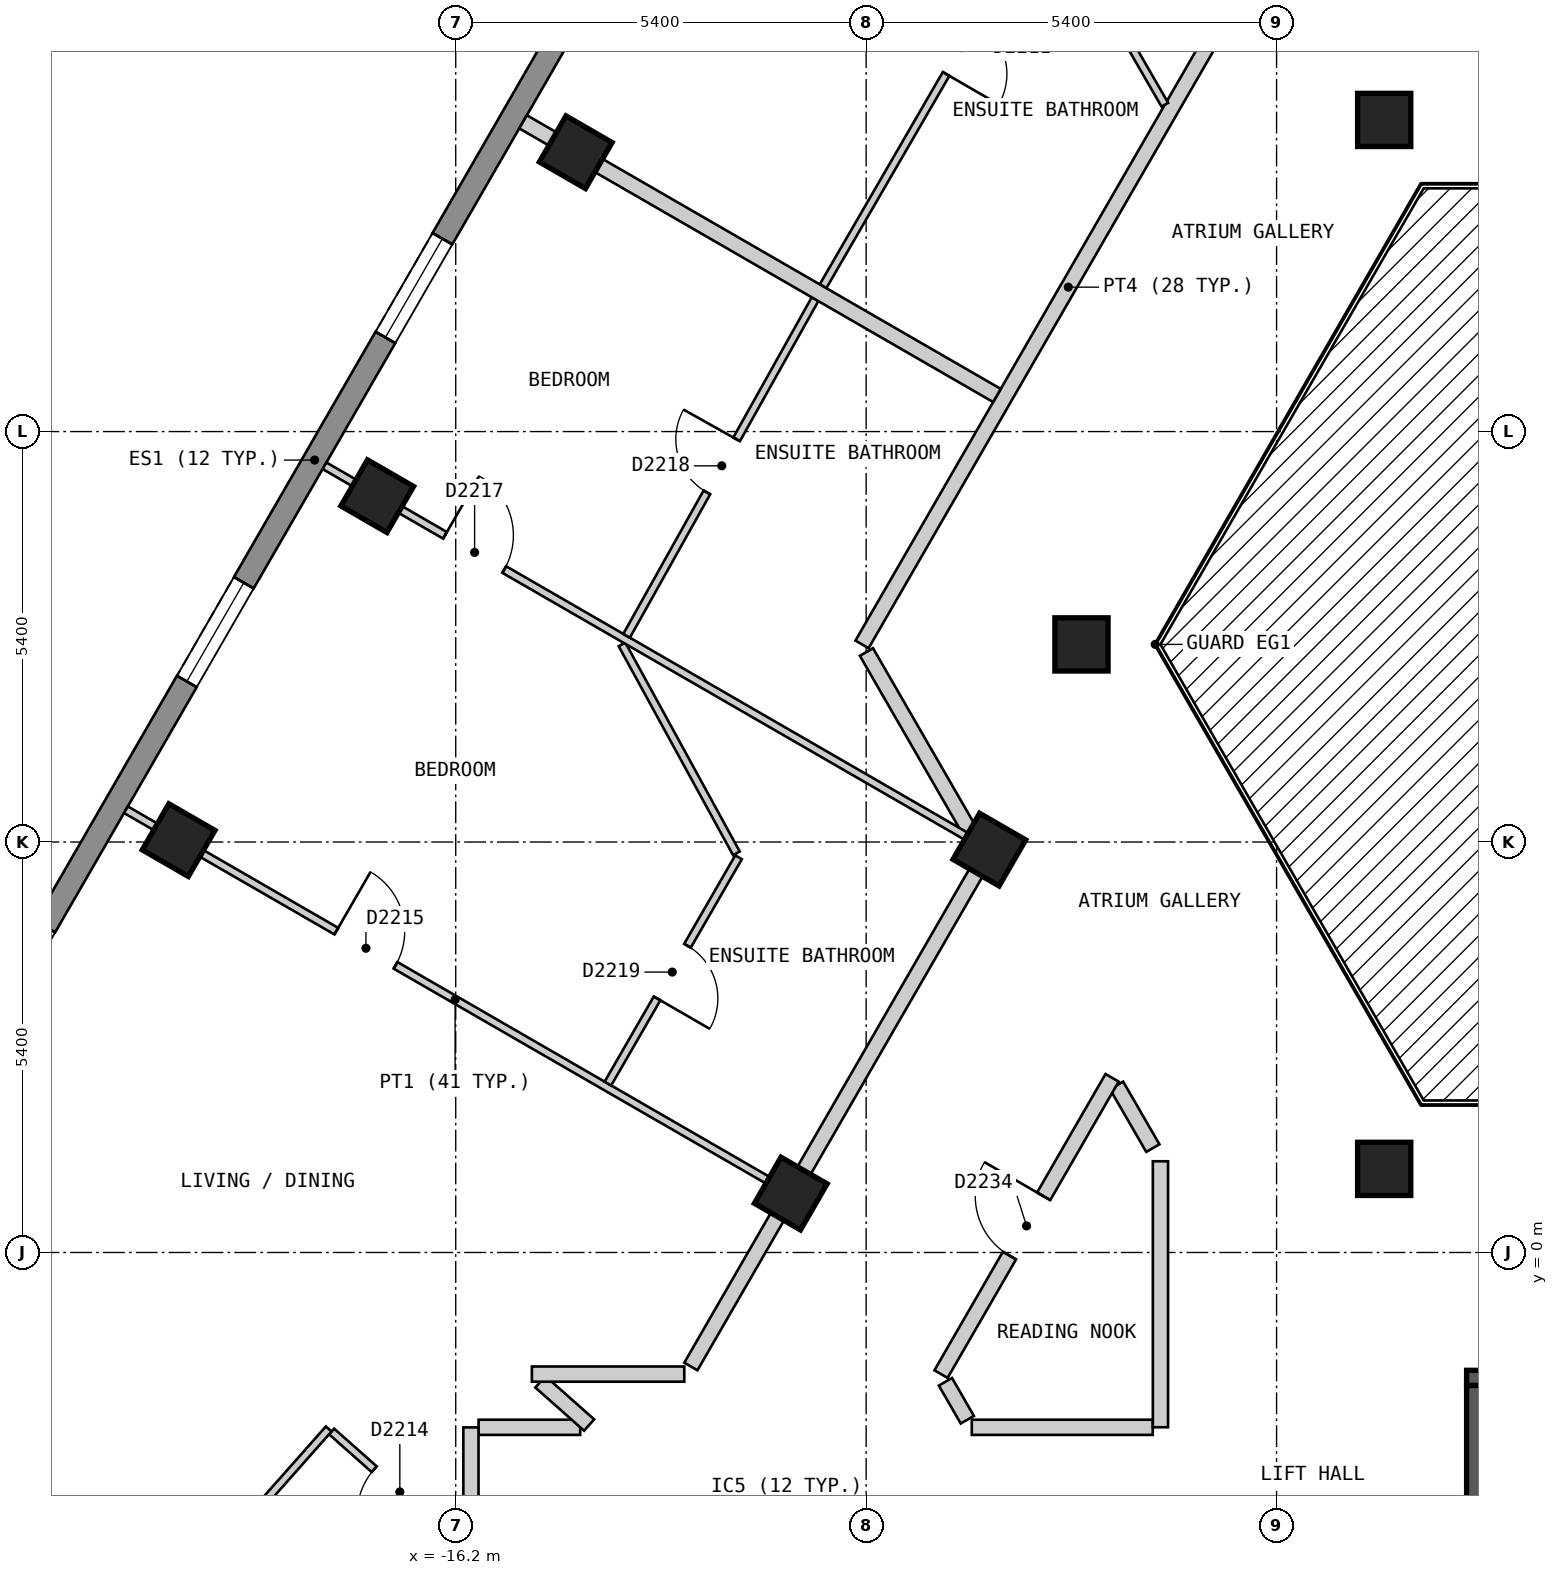
"""IFC4 building model, lengths in metres.
Left out: names, types, materials, properties, quantities, classifications, styles, units other than length and angle.
Written with IfcOpenShell. Run it as: python <this file> out.ifc"""

import sys

from ifc_helpers import new_model, si_unit, direction, frame, frame_2d, origin, origin_2d, place, context, subcontext, project, spatial, polyline, rectangle, outline, extrude, element, fill, save


model = new_model("IFC4")
c1 = context("Model", 3, precision=1e-05, world=origin(), true_north=direction((0.0, 1.0)))
c2 = subcontext(c1, "Body", "Model", "MODEL_VIEW")
j1 = project(units=[si_unit("LENGTHUNIT", "METRE"), si_unit("PLANEANGLEUNIT", "RADIAN")], contexts=[c1])
p1 = place(None, origin())
s1 = spatial("IfcSite", under=j1, at=p1, CompositionType="ELEMENT")
p2 = place(p1, origin())
s2 = spatial("IfcBuilding", under=s1, at=p2, CompositionType="ELEMENT")
p3 = place(p2, frame((0.0, 0.0, 229.8)))
s3 = spatial("IfcBuildingStorey", under=s2, at=p3, CompositionType="ELEMENT", Elevation=229.8)
for number, where, z_axis, x_axis in (
    (1, (-14.621, 14.475, 0.0), (0.0, 0.0, 1.0), (-0.5, -0.866, 0.0)),
    (2, (-17.233, 9.95, 0.0), (0.0, 0.0, 1.0), (-0.5, -0.866, 0.0)),
    (3, (-19.846, 5.425, 0.0), (0.0, 0.0, 1.0), (-0.5, -0.866, 0.0)),
    (4, (-3.984, 14.9, 0.0), (0.0, 0.0, 1.0), (1.0, 0.0, 0.0)),
    (5, (-7.967, 8.0, 0.0), (0.0, 0.0, 1.0), (1.0, 0.0, 0.0)),
    (6, (-9.179, 5.3, 0.0), (0.0, 0.0, 1.0), (-0.5, -0.866, 0.0)),
    (7, (-3.984, 1.1, 0.0), (0.0, 0.0, 1.0), (1.0, 0.0, 0.0)),
    (8, (-11.792, 0.775, 0.0), (0.0, 0.0, 1.0), (-0.5, -0.866, 0.0)),
):
    element("IfcColumn", number, at=place(p3, frame(where, z_axis=z_axis, x_axis=x_axis)), inside=s3, PredefinedType="COLUMN", context=c2, shape_type="SweptSolid", body=[
        extrude(rectangle(XDim=0.7, YDim=0.7, at=origin_2d()), origin(), (0.0, 0.0, 1.0), 3.0),
    ])
p4 = place(p3, frame((-12.514, 20.025, 0.0), z_axis=(0.0, 0.0, 1.0), x_axis=(-0.500003656944, -0.866023292436, 0.0)))
e9 = element("IfcWall", 9, at=p4, inside=s3, PredefinedType="SOLIDWALL", context=c2, shape_type="SweptSolid", body=[
    extrude(outline(polyline([(0.0, -0.15), (22.17, -0.15), (22.09, 0.15), (0.08, 0.15), (0.0, -0.15)])), origin(), (0.0, 0.0, 1.0), 2.7),
])
p5 = place(p4, frame((2.497, 0.0, 0.15)))
e10 = element("IfcOpeningElement", 10, at=p5, cuts=e9, PredefinedType="OPENING", context=c2, shape_type="SweptSolid", body=[
    extrude(rectangle(XDim=1.5, YDim=2.1, at=frame_2d((0.75, 1.05))), frame((0.0, 0.16, 0.0), z_axis=(0.0, -1.0, 0.0), x_axis=(1.0, 0.0, 0.0)), (0.0, 0.0, 1.0), 0.32),
])
p6 = place(p4, frame((7.722, 0.0, 0.15)))
e11 = element("IfcOpeningElement", 11, at=p6, cuts=e9, PredefinedType="OPENING", context=c2, shape_type="SweptSolid", body=[
    extrude(rectangle(XDim=1.5, YDim=2.1, at=frame_2d((0.75, 1.05))), frame((0.0, 0.16, 0.0), z_axis=(0.0, -1.0, 0.0), x_axis=(1.0, 0.0, 0.0)), (0.0, 0.0, 1.0), 0.32),
])
p7 = place(p4, frame((12.948, 0.0, 0.15)))
e12 = element("IfcOpeningElement", 12, at=p7, cuts=e9, PredefinedType="OPENING", context=c2, shape_type="SweptSolid", body=[
    extrude(rectangle(XDim=1.5, YDim=2.1, at=frame_2d((0.75, 1.05))), frame((0.0, 0.16, 0.0), z_axis=(0.0, -1.0, 0.0), x_axis=(1.0, 0.0, 0.0)), (0.0, 0.0, 1.0), 0.32),
])
p8 = place(p4, frame((18.173, 0.0, 0.15)))
e13 = element("IfcOpeningElement", 13, at=p8, cuts=e9, PredefinedType="OPENING", context=c2, shape_type="SweptSolid", body=[
    extrude(rectangle(XDim=1.5, YDim=2.1, at=frame_2d((0.75, 1.05))), frame((0.0, 0.16, 0.0), z_axis=(0.0, -1.0, 0.0), x_axis=(1.0, 0.0, 0.0)), (0.0, 0.0, 1.0), 0.32),
])
p9 = place(p3, frame((-2.9, -1.65, 0.0), z_axis=(0.0, 0.0, 1.0), x_axis=(1.0, 0.0, 0.0)))
e14 = element("IfcWall", 14, at=p9, inside=s3, PredefinedType="SOLIDWALL", context=c2, shape_type="SweptSolid", body=[
    extrude(rectangle(XDim=5.8, YDim=0.2, at=frame_2d((2.9, 0.0))), origin(), (0.0, 0.0, 1.0), 2.7),
])
p10 = place(p9, frame((0.3, 0.0, 0.0)))
e15 = element("IfcOpeningElement", 15, at=p10, cuts=e14, PredefinedType="OPENING", context=c2, shape_type="SweptSolid", body=[
    extrude(rectangle(XDim=1.2, YDim=2.1, at=frame_2d((0.6, 1.05))), frame((0.0, 0.11, 0.0), z_axis=(0.0, -1.0, 0.0), x_axis=(1.0, 0.0, 0.0)), (0.0, 0.0, 1.0), 0.22),
])
p11 = place(p3, frame((-2.8, -4.5, 0.0), z_axis=(0.0, 0.0, 1.0), x_axis=(0.0, 1.0, 0.0)))
e16 = element("IfcWall", 16, at=p11, inside=s3, PredefinedType="SOLIDWALL", context=c2, shape_type="SweptSolid", body=[
    extrude(rectangle(XDim=2.75, YDim=0.2, at=frame_2d((1.375, 0.0))), origin(), (0.0, 0.0, 1.0), 2.7),
])
p12 = place(p3, frame((-10.796, 7.9, 0.0), z_axis=(0.0, 0.0, 1.0), x_axis=(0.499674397761, -0.866213308731, 0.0)))
e17 = element("IfcWall", 17, at=p12, inside=s3, PredefinedType="PARTITIONING", context=c2, shape_type="SweptSolid", body=[
    extrude(rectangle(XDim=2.785, YDim=0.2, at=frame_2d((1.393, 0.0))), origin(), (0.0, 0.0, 1.0), 2.7),
])
p13 = place(p3, frame((-7.505, 2.198, 0.0), z_axis=(0.0, 0.0, 1.0), x_axis=(0.500409926597, -0.865788603161, 0.0)))
e18 = element("IfcWall", 18, at=p13, inside=s3, PredefinedType="PARTITIONING", context=c2, shape_type="SweptSolid", body=[
    extrude(rectangle(XDim=0.953, YDim=0.2, at=frame_2d((0.477, 0.0))), origin(), (0.0, 0.0, 1.0), 2.7),
])
p14 = place(p3, frame((-9.757, -1.701, 0.0), z_axis=(0.0, 0.0, 1.0), x_axis=(0.49996696679, -0.866044474677, 0.0)))
e19 = element("IfcWall", 19, at=p14, inside=s3, PredefinedType="PARTITIONING", context=c2, shape_type="SweptSolid", body=[
    extrude(rectangle(XDim=0.576, YDim=0.2, at=frame_2d((0.288, 0.0))), origin(), (0.0, 0.0, 1.0), 2.7),
])
p15 = place(p3, frame((-15.899, -2.3, 0.0), z_axis=(0.0, 0.0, 1.0), x_axis=(1.0, 0.0, 0.0)))
e20 = element("IfcWall", 20, at=p15, inside=s3, PredefinedType="PARTITIONING", context=c2, shape_type="SweptSolid", body=[
    extrude(rectangle(XDim=1.337, YDim=0.2, at=frame_2d((0.668, 0.0))), origin(), (0.0, 0.0, 1.0), 2.7),
])
p16 = place(p3, frame((-9.41, -2.3, 0.0), z_axis=(0.0, 0.0, 1.0), x_axis=(1.0, 0.0, 0.0)))
e21 = element("IfcWall", 21, at=p16, inside=s3, PredefinedType="PARTITIONING", context=c2, shape_type="SweptSolid", body=[
    extrude(rectangle(XDim=2.381, YDim=0.2, at=frame_2d((1.19, 0.0))), origin(), (0.0, 0.0, 1.0), 2.7),
])
p17 = place(p3, frame((-9.815, -1.6, 0.0), z_axis=(0.0, 0.0, 1.0), x_axis=(0.500058909736, 0.865991389561, 0.0)))
e22 = element("IfcWall", 22, at=p17, inside=s3, PredefinedType="PARTITIONING", context=c2, shape_type="SweptSolid", body=[
    extrude(rectangle(XDim=4.501, YDim=0.2, at=frame_2d((2.251, 0.0))), origin(), (0.0, 0.0, 1.0), 2.7),
])
p18 = place(p17, frame((1.801, 0.0, 0.0)))
e23 = element("IfcOpeningElement", 23, at=p18, cuts=e22, PredefinedType="OPENING", context=c2, shape_type="SweptSolid", body=[
    extrude(rectangle(XDim=0.9, YDim=2.1, at=frame_2d((0.45, 1.05))), frame((0.0, 0.11, 0.0), z_axis=(0.0, -1.0, 0.0), x_axis=(1.0, 0.0, 0.0)), (0.0, 0.0, 1.0), 0.22),
])
p19 = place(p3, frame((-13.106, -1.5, 0.0), z_axis=(0.0, 0.0, 1.0), x_axis=(0.500025705601, 0.86601056214, 0.0)))
e24 = element("IfcWall", 24, at=p19, inside=s3, PredefinedType="PARTITIONING", context=c2, shape_type="SweptSolid", body=[
    extrude(rectangle(XDim=7.735, YDim=0.2, at=frame_2d((3.868, 0.0))), origin(), (0.0, 0.0, 1.0), 2.7),
])
p20 = place(p3, frame((-10.854, 8.0, 0.0), z_axis=(0.0, 0.0, 1.0), x_axis=(0.499997637144, 0.866026767976, 0.0)))
e25 = element("IfcWall", 25, at=p20, inside=s3, PredefinedType="PARTITIONING", context=c2, shape_type="SweptSolid", body=[
    extrude(rectangle(XDim=10.854, YDim=0.2, at=frame_2d((5.427, 0.0))), origin(), (0.0, 0.0, 1.0), 2.7),
])
p21 = place(p3, frame((-6.928, -2.299, 0.0), z_axis=(0.0, 0.0, 1.0), x_axis=(0.0, 1.0, 0.0)))
e26 = element("IfcWall", 26, at=p21, inside=s3, PredefinedType="PARTITIONING", context=c2, shape_type="SweptSolid", body=[
    extrude(rectangle(XDim=3.499, YDim=0.2, at=frame_2d((1.75, 0.0))), origin(), (0.0, 0.0, 1.0), 2.7),
])
p22 = place(p3, frame((-16.0, -6.099, 0.0), z_axis=(0.0, 0.0, 1.0), x_axis=(0.0, 1.0, 0.0)))
e27 = element("IfcWall", 27, at=p22, inside=s3, PredefinedType="PARTITIONING", context=c2, shape_type="SweptSolid", body=[
    extrude(rectangle(XDim=3.798, YDim=0.2, at=frame_2d((1.899, 0.0))), origin(), (0.0, 0.0, 1.0), 2.7),
])
p23 = place(p22, frame((0.587, 0.0, 0.0)))
e28 = element("IfcOpeningElement", 28, at=p23, cuts=e27, PredefinedType="OPENING", context=c2, shape_type="SweptSolid", body=[
    extrude(rectangle(XDim=1.0, YDim=2.1, at=frame_2d((0.5, 1.05))), frame((0.0, 0.11, 0.0), z_axis=(0.0, -1.0, 0.0), x_axis=(1.0, 0.0, 0.0)), (0.0, 0.0, 1.0), 0.22),
])
p24 = place(p3, frame((-7.628, 16.412, 0.0), z_axis=(0.0, 0.0, 1.0), x_axis=(0.500159472144, -0.86593331292, 0.0)))
e29 = element("IfcWall", 29, at=p24, inside=s3, PredefinedType="PARTITIONING", context=c2, shape_type="SweptSolid", body=[
    extrude(rectangle(XDim=1.515, YDim=0.1, at=frame_2d((0.758, 0.0))), origin(), (0.0, 0.0, 1.0), 2.7),
])
p25 = place(p3, frame((-14.012, 8.0, 0.0), z_axis=(0.0, 0.0, 1.0), x_axis=(0.480183343847, -0.877168145963, 0.0)))
e30 = element("IfcWall", 30, at=p25, inside=s3, PredefinedType="PARTITIONING", context=c2, shape_type="SweptSolid", body=[
    extrude(rectangle(XDim=3.134, YDim=0.1, at=frame_2d((1.567, 0.0))), origin(), (0.0, 0.0, 1.0), 2.7),
])
p26 = place(p3, frame((-20.539, 5.825, 0.0), z_axis=(0.0, 0.0, 1.0), x_axis=(0.866089650643, -0.499888704662, 0.0)))
e31 = element("IfcWall", 31, at=p26, inside=s3, PredefinedType="PARTITIONING", context=c2, shape_type="SweptSolid", body=[
    extrude(rectangle(XDim=10.0, YDim=0.1, at=frame_2d((5.0, 0.0))), origin(), (0.0, 0.0, 1.0), 2.7),
])
p27 = place(p26, frame((3.196, 0.0, 0.0)))
e32 = element("IfcOpeningElement", 32, at=p27, cuts=e31, PredefinedType="OPENING", context=c2, shape_type="SweptSolid", body=[
    extrude(rectangle(XDim=0.9, YDim=2.1, at=frame_2d((0.45, 1.05))), frame((0.0, 0.06, 0.0), z_axis=(0.0, -1.0, 0.0), x_axis=(1.0, 0.0, 0.0)), (0.0, 0.0, 1.0), 0.12),
])
p28 = place(p3, frame((-23.429, -2.858, 0.0), z_axis=(0.0, 0.0, 1.0), x_axis=(0.8659754619, -0.500086491905, 0.0)))
e33 = element("IfcWall", 33, at=p28, inside=s3, PredefinedType="PARTITIONING", context=c2, shape_type="SweptSolid", body=[
    extrude(rectangle(XDim=3.831, YDim=0.1, at=frame_2d((1.916, 0.0))), origin(), (0.0, 0.0, 1.0), 2.7),
])
p29 = place(p28, frame((1.991, 0.0, 0.0)))
e34 = element("IfcOpeningElement", 34, at=p29, cuts=e33, PredefinedType="OPENING", context=c2, shape_type="SweptSolid", body=[
    extrude(rectangle(XDim=0.9, YDim=2.1, at=frame_2d((0.45, 1.05))), frame((0.0, 0.06, 0.0), z_axis=(0.0, -1.0, 0.0), x_axis=(1.0, 0.0, 0.0)), (0.0, 0.0, 1.0), 0.12),
])
p30 = place(p3, frame((-17.926, 10.35, 0.0), z_axis=(0.0, 0.0, 1.0), x_axis=(0.866018411306, -0.500012111133, 0.0)))
e35 = element("IfcWall", 35, at=p30, inside=s3, PredefinedType="PARTITIONING", context=c2, shape_type="SweptSolid", body=[
    extrude(rectangle(XDim=9.898, YDim=0.1, at=frame_2d((4.949, 0.0))), origin(), (0.0, 0.0, 1.0), 2.7),
])
p31 = place(p30, frame((1.83, 0.0, 0.0)))
e36 = element("IfcOpeningElement", 36, at=p31, cuts=e35, PredefinedType="OPENING", context=c2, shape_type="SweptSolid", body=[
    extrude(rectangle(XDim=0.9, YDim=2.1, at=frame_2d((0.45, 1.05))), frame((0.0, 0.06, 0.0), z_axis=(0.0, -1.0, 0.0), x_axis=(1.0, 0.0, 0.0)), (0.0, 0.0, 1.0), 0.12),
])
p32 = place(p3, frame((-17.833, -2.355, 0.0), z_axis=(0.0, 0.0, 1.0), x_axis=(0.748577710953, -0.663047065196, 0.0)))
e37 = element("IfcWall", 37, at=p32, inside=s3, PredefinedType="PARTITIONING", context=c2, shape_type="SweptSolid", body=[
    extrude(rectangle(XDim=2.315, YDim=0.1, at=frame_2d((1.157, 0.0))), origin(), (0.0, 0.0, 1.0), 2.7),
])
p33 = place(p32, frame((0.749, 0.0, 0.0)))
e38 = element("IfcOpeningElement", 38, at=p33, cuts=e37, PredefinedType="OPENING", context=c2, shape_type="SweptSolid", body=[
    extrude(rectangle(XDim=0.9, YDim=2.1, at=frame_2d((0.45, 1.05))), frame((0.0, 0.06, 0.0), z_axis=(0.0, -1.0, 0.0), x_axis=(1.0, 0.0, 0.0)), (0.0, 0.0, 1.0), 0.12),
])
p34 = place(p3, frame((-14.198, 2.222, 0.0), z_axis=(0.0, 0.0, 1.0), x_axis=(0.500042121486, 0.866001083567, 0.0)))
e39 = element("IfcWall", 39, at=p34, inside=s3, PredefinedType="PARTITIONING", context=c2, shape_type="SweptSolid", body=[
    extrude(rectangle(XDim=3.438, YDim=0.1, at=frame_2d((1.719, 0.0))), origin(), (0.0, 0.0, 1.0), 2.7),
])
p35 = place(p34, frame((1.294, 0.0, 0.0)))
e40 = element("IfcOpeningElement", 40, at=p35, cuts=e39, PredefinedType="OPENING", context=c2, shape_type="SweptSolid", body=[
    extrude(rectangle(XDim=0.8, YDim=2.1, at=frame_2d((0.4, 1.05))), frame((0.0, 0.06, 0.0), z_axis=(0.0, -1.0, 0.0), x_axis=(1.0, 0.0, 0.0)), (0.0, 0.0, 1.0), 0.12),
])
p36 = place(p3, frame((-11.367, 12.712, 0.0), z_axis=(0.0, 0.0, 1.0), x_axis=(0.501473866443, 0.865172792727, 0.0)))
e41 = element("IfcWall", 41, at=p36, inside=s3, PredefinedType="PARTITIONING", context=c2, shape_type="SweptSolid", body=[
    extrude(rectangle(XDim=7.256, YDim=0.1, at=frame_2d((3.628, 0.0))), origin(), (0.0, 0.0, 1.0), 2.7),
])
p37 = place(p36, frame((3.228, 0.0, 0.0)))
e42 = element("IfcOpeningElement", 42, at=p37, cuts=e41, PredefinedType="OPENING", context=c2, shape_type="SweptSolid", body=[
    extrude(rectangle(XDim=0.8, YDim=2.1, at=frame_2d((0.4, 1.05))), frame((0.0, 0.06, 0.0), z_axis=(0.0, -1.0, 0.0), x_axis=(1.0, 0.0, 0.0)), (0.0, 0.0, 1.0), 0.12),
])
p38 = place(p3, frame((-13.952, 8.113, 0.0), z_axis=(0.0, 0.0, 1.0), x_axis=(0.488568218554, 0.872525699231, 0.0)))
e43 = element("IfcWall", 43, at=p38, inside=s3, PredefinedType="PARTITIONING", context=c2, shape_type="SweptSolid", body=[
    extrude(rectangle(XDim=5.076, YDim=0.1, at=frame_2d((2.538, 0.0))), origin(), (0.0, 0.0, 1.0), 2.7),
])
p39 = place(p38, frame((2.163, 0.0, 0.0)))
e44 = element("IfcOpeningElement", 44, at=p39, cuts=e43, PredefinedType="OPENING", context=c2, shape_type="SweptSolid", body=[
    extrude(rectangle(XDim=0.8, YDim=2.1, at=frame_2d((0.4, 1.05))), frame((0.0, 0.06, 0.0), z_axis=(0.0, -1.0, 0.0), x_axis=(1.0, 0.0, 0.0)), (0.0, 0.0, 1.0), 0.12),
])
p40 = place(p3, frame((-20.716, -5.532, 0.0), z_axis=(0.0, 0.0, 1.0), x_axis=(0.663278535613, 0.748372623895, 0.0)))
e45 = element("IfcWall", 45, at=p40, inside=s3, PredefinedType="PARTITIONING", context=c2, shape_type="SweptSolid", body=[
    extrude(rectangle(XDim=4.289, YDim=0.1, at=frame_2d((2.145, 0.0))), origin(), (0.0, 0.0, 1.0), 2.7),
])
p41 = place(p3, frame((-15.314, 14.875, 0.0), z_axis=(0.0, 0.0, 1.0), x_axis=(0.866001485781, -0.500041424909, 0.0)))
e46 = element("IfcWall", 46, at=p41, inside=s3, PredefinedType="PARTITIONING", context=c2, shape_type="SweptSolid", body=[
    extrude(rectangle(XDim=7.2, YDim=0.2, at=frame_2d((3.6, 0.0))), origin(), (0.0, 0.0, 1.0), 2.7),
])
p42 = place(p3, frame((-15.086, -1.702, 0.0), z_axis=(0.0, 0.0, 1.0), x_axis=(0.748305129876, -0.663354680846, 0.0)))
e47 = element("IfcWall", 47, at=p42, inside=s3, PredefinedType="PARTITIONING", context=c2, shape_type="SweptSolid", body=[
    extrude(rectangle(XDim=0.856, YDim=0.2, at=frame_2d((0.428, 0.0))), origin(), (0.0, 0.0, 1.0), 2.7),
])
p43 = place(p3, frame((-15.198, -1.6, 0.0), z_axis=(0.0, 0.0, 1.0), x_axis=(1.0, 0.0, 0.0)))
e48 = element("IfcWall", 48, at=p43, inside=s3, PredefinedType="PARTITIONING", context=c2, shape_type="SweptSolid", body=[
    extrude(rectangle(XDim=2.005, YDim=0.2, at=frame_2d((1.002, 0.0))), origin(), (0.0, 0.0, 1.0), 2.7),
])
p44 = place(p6, origin())
e49 = element("IfcWindow", 49, at=p44, inside=s3, PartitioningType="SINGLE_PANEL", PredefinedType="WINDOW", context=c2, shape_type="SweptSolid", body=[
    extrude(rectangle(XDim=1.5, YDim=2.1, at=frame_2d((0.75, 1.05))), frame((0.0, 0.03, 0.0), z_axis=(0.0, -1.0, 0.0), x_axis=(1.0, 0.0, 0.0)), (0.0, 0.0, 1.0), 0.06),
])
fill(e11, e49)
p45 = place(p7, origin())
e50 = element("IfcWindow", 50, at=p45, inside=s3, PartitioningType="SINGLE_PANEL", PredefinedType="WINDOW", context=c2, shape_type="SweptSolid", body=[
    extrude(rectangle(XDim=1.5, YDim=2.1, at=frame_2d((0.75, 1.05))), frame((0.0, 0.03, 0.0), z_axis=(0.0, -1.0, 0.0), x_axis=(1.0, 0.0, 0.0)), (0.0, 0.0, 1.0), 0.06),
])
fill(e12, e50)
p46 = place(p37, origin())
e51 = element("IfcDoor", 51, at=p46, inside=s3, OperationType="SINGLE_SWING_LEFT", PredefinedType="DOOR", context=c2, shape_type="SweptSolid", body=[
    extrude(rectangle(XDim=0.8, YDim=2.1, at=frame_2d((0.4, 1.05))), frame((0.0, 0.025, 0.0), z_axis=(0.0, -1.0, 0.0), x_axis=(1.0, 0.0, 0.0)), (0.0, 0.0, 1.0), 0.05),
])
fill(e42, e51)
p47 = place(p33, origin())
e52 = element("IfcDoor", 52, at=p47, inside=s3, OperationType="SINGLE_SWING_RIGHT", PredefinedType="DOOR", context=c2, shape_type="SweptSolid", body=[
    extrude(rectangle(XDim=0.9, YDim=2.1, at=frame_2d((0.45, 1.05))), frame((0.0, 0.025, 0.0), z_axis=(0.0, -1.0, 0.0), x_axis=(1.0, 0.0, 0.0)), (0.0, 0.0, 1.0), 0.05),
])
fill(e38, e52)
p48 = place(p27, origin())
e53 = element("IfcDoor", 53, at=p48, inside=s3, OperationType="SINGLE_SWING_LEFT", PredefinedType="DOOR", context=c2, shape_type="SweptSolid", body=[
    extrude(rectangle(XDim=0.9, YDim=2.1, at=frame_2d((0.45, 1.05))), frame((0.0, 0.025, 0.0), z_axis=(0.0, -1.0, 0.0), x_axis=(1.0, 0.0, 0.0)), (0.0, 0.0, 1.0), 0.05),
])
fill(e32, e53)
p49 = place(p31, origin())
e54 = element("IfcDoor", 54, at=p49, inside=s3, OperationType="SINGLE_SWING_LEFT", PredefinedType="DOOR", context=c2, shape_type="SweptSolid", body=[
    extrude(rectangle(XDim=0.9, YDim=2.1, at=frame_2d((0.45, 1.05))), frame((0.0, 0.025, 0.0), z_axis=(0.0, -1.0, 0.0), x_axis=(1.0, 0.0, 0.0)), (0.0, 0.0, 1.0), 0.05),
])
fill(e36, e54)
p50 = place(p39, origin())
e55 = element("IfcDoor", 55, at=p50, inside=s3, OperationType="SINGLE_SWING_RIGHT", PredefinedType="DOOR", context=c2, shape_type="SweptSolid", body=[
    extrude(rectangle(XDim=0.8, YDim=2.1, at=frame_2d((0.4, 1.05))), frame((0.0, 0.025, 0.0), z_axis=(0.0, -1.0, 0.0), x_axis=(1.0, 0.0, 0.0)), (0.0, 0.0, 1.0), 0.05),
])
fill(e44, e55)
p51 = place(p35, origin())
e56 = element("IfcDoor", 56, at=p51, inside=s3, OperationType="SINGLE_SWING_LEFT", PredefinedType="DOOR", context=c2, shape_type="SweptSolid", body=[
    extrude(rectangle(XDim=0.8, YDim=2.1, at=frame_2d((0.4, 1.05))), frame((0.0, 0.025, 0.0), z_axis=(0.0, -1.0, 0.0), x_axis=(1.0, 0.0, 0.0)), (0.0, 0.0, 1.0), 0.05),
])
fill(e40, e56)
p52 = place(p18, origin())
e57 = element("IfcDoor", 57, at=p52, inside=s3, OperationType="SINGLE_SWING_RIGHT", PredefinedType="DOOR", context=c2, shape_type="SweptSolid", body=[
    extrude(rectangle(XDim=0.9, YDim=2.1, at=frame_2d((0.45, 1.05))), frame((0.0, 0.025, 0.0), z_axis=(0.0, -1.0, 0.0), x_axis=(1.0, 0.0, 0.0)), (0.0, 0.0, 1.0), 0.05),
])
fill(e23, e57)
save(model, sys.argv[1])
